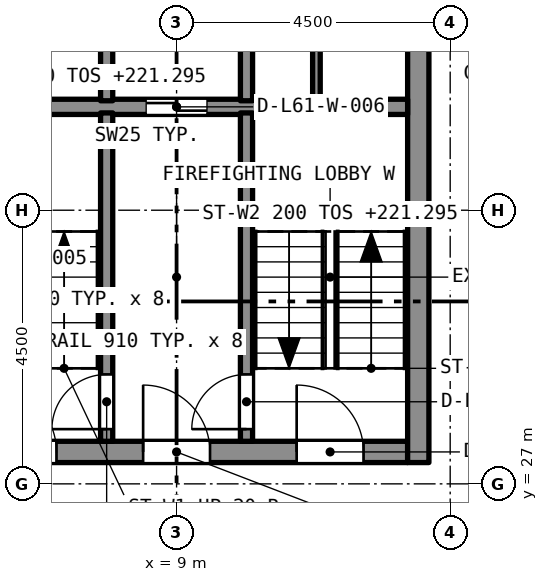
"""IFC4 building model, lengths in metres.
Left out: names, types, materials, properties, quantities, classifications, styles, units other than length and angle.
Written with IfcOpenShell. Run it as: python <this file> out.ifc"""

import sys

from ifc_helpers import new_model, si_unit, direction, frame, frame_2d, origin, place, context, subcontext, project, spatial, rectangle, extrude, element, fill, save


model = new_model("IFC4")
c1 = context("Model", 3, precision=1e-05, world=origin(), true_north=direction((0.0, 1.0)))
c2 = subcontext(c1, "Body", "Model", "MODEL_VIEW")
j1 = project(units=[si_unit("LENGTHUNIT", "METRE"), si_unit("PLANEANGLEUNIT", "RADIAN")], contexts=[c1])
p1 = place(None, origin())
s1 = spatial("IfcSite", under=j1, at=p1, CompositionType="ELEMENT")
p2 = place(p1, origin())
s2 = spatial("IfcBuilding", under=s1, at=p2, CompositionType="ELEMENT")
p3 = place(p2, frame((0.0, 0.0, 219.695)))
s3 = spatial("IfcBuildingStorey", under=s2, at=p3, CompositionType="ELEMENT", Elevation=219.695)
p4 = place(p3, frame((5.2, 27.525, 0.0), z_axis=(0.0, 0.0, 1.0), x_axis=(1.0, 0.0, 0.0)))
e1 = element("IfcWall", 1, at=p4, inside=s3, PredefinedType="SOLIDWALL", context=c2, shape_type="SweptSolid", body=[
    extrude(rectangle(XDim=7.6, YDim=0.35, at=frame_2d((3.8, 0.0))), origin(), (0.0, 0.0, 1.0), 3.2),
])
p5 = place(p4, frame((0.725, 0.0, 0.0)))
e2 = element("IfcOpeningElement", 2, at=p5, cuts=e1, PredefinedType="OPENING", context=c2, shape_type="SweptSolid", body=[
    extrude(rectangle(XDim=1.1, YDim=2.1, at=frame_2d((0.55, 1.05))), frame((0.0, 0.185, 0.0), z_axis=(0.0, -1.0, 0.0), x_axis=(1.0, 0.0, 0.0)), (0.0, 0.0, 1.0), 0.37),
])
p6 = place(p4, frame((3.25, 0.0, 0.0)))
e3 = element("IfcOpeningElement", 3, at=p6, cuts=e1, PredefinedType="OPENING", context=c2, shape_type="SweptSolid", body=[
    extrude(rectangle(XDim=1.1, YDim=2.1, at=frame_2d((0.55, 1.05))), frame((0.0, 0.185, 0.0), z_axis=(0.0, -1.0, 0.0), x_axis=(1.0, 0.0, 0.0)), (0.0, 0.0, 1.0), 0.37),
])
p7 = place(p4, frame((5.775, 0.0, 0.0)))
e4 = element("IfcOpeningElement", 4, at=p7, cuts=e1, PredefinedType="OPENING", context=c2, shape_type="SweptSolid", body=[
    extrude(rectangle(XDim=1.1, YDim=2.1, at=frame_2d((0.55, 1.05))), frame((0.0, 0.185, 0.0), z_axis=(0.0, -1.0, 0.0), x_axis=(1.0, 0.0, 0.0)), (0.0, 0.0, 1.0), 0.37),
])
p8 = place(p3, frame((12.975, 27.35, 0.0), z_axis=(0.0, 0.0, 1.0), x_axis=(0.0, 1.0, 0.0)))
e5 = element("IfcWall", 5, at=p8, inside=s3, PredefinedType="SOLIDWALL", context=c2, shape_type="SweptSolid", body=[
    extrude(rectangle(XDim=12.8, YDim=0.35, at=frame_2d((6.4, 0.0))), origin(), (0.0, 0.0, 1.0), 3.2),
])
p9 = place(p8, frame((10.75, 0.0, 0.0)))
e6 = element("IfcOpeningElement", 6, at=p9, cuts=e5, PredefinedType="OPENING", context=c2, shape_type="SweptSolid", body=[
    extrude(rectangle(XDim=1.1, YDim=2.1, at=frame_2d((0.55, 1.05))), frame((0.0, 0.185, 0.0), z_axis=(0.0, -1.0, 0.0), x_axis=(1.0, 0.0, 0.0)), (0.0, 0.0, 1.0), 0.37),
])
p10 = place(p8, frame((8.6, 0.0, 0.0)))
e7 = element("IfcOpeningElement", 7, at=p10, cuts=e5, PredefinedType="OPENING", context=c2, shape_type="SweptSolid", body=[
    extrude(rectangle(XDim=1.2, YDim=2.1, at=frame_2d((0.6, 1.05))), frame((0.0, 0.185, 0.0), z_axis=(0.0, -1.0, 0.0), x_axis=(1.0, 0.0, 0.0)), (0.0, 0.0, 1.0), 0.37),
])
p11 = place(p3, frame((5.2, 33.2, 0.0), z_axis=(0.0, 0.0, 1.0), x_axis=(1.0, 0.0, 0.0)))
e8 = element("IfcWall", 8, at=p11, inside=s3, PredefinedType="SOLIDWALL", context=c2, shape_type="SweptSolid", body=[
    extrude(rectangle(XDim=7.6, YDim=0.25, at=frame_2d((3.8, 0.0))), origin(), (0.0, 0.0, 1.0), 2.9),
])
p12 = place(p11, frame((3.3, 0.0, 0.0)))
e9 = element("IfcOpeningElement", 9, at=p12, cuts=e8, PredefinedType="OPENING", context=c2, shape_type="SweptSolid", body=[
    extrude(rectangle(XDim=1.0, YDim=2.1, at=frame_2d((0.5, 1.05))), frame((0.0, 0.135, 0.0), z_axis=(0.0, -1.0, 0.0), x_axis=(1.0, 0.0, 0.0)), (0.0, 0.0, 1.0), 0.27),
])
p13 = place(p3, frame((7.85, 27.7, 0.0), z_axis=(0.0, 0.0, 1.0), x_axis=(0.0, 1.0, 0.0)))
e10 = element("IfcWall", 10, at=p13, inside=s3, PredefinedType="SOLIDWALL", context=c2, shape_type="SweptSolid", body=[
    extrude(rectangle(XDim=5.4, YDim=0.2, at=frame_2d((2.7, 0.0))), origin(), (0.0, 0.0, 1.0), 2.9),
])
p14 = place(p13, frame((0.2, 0.0, 0.0)))
e11 = element("IfcOpeningElement", 11, at=p14, cuts=e10, PredefinedType="OPENING", context=c2, shape_type="SweptSolid", body=[
    extrude(rectangle(XDim=0.9, YDim=2.1, at=frame_2d((0.45, 1.05))), frame((0.0, 0.11, 0.0), z_axis=(0.0, -1.0, 0.0), x_axis=(1.0, 0.0, 0.0)), (0.0, 0.0, 1.0), 0.22),
])
p15 = place(p3, frame((10.15, 27.7, 0.0), z_axis=(0.0, 0.0, 1.0), x_axis=(0.0, 1.0, 0.0)))
e12 = element("IfcWall", 12, at=p15, inside=s3, PredefinedType="SOLIDWALL", context=c2, shape_type="SweptSolid", body=[
    extrude(rectangle(XDim=5.4, YDim=0.2, at=frame_2d((2.7, 0.0))), origin(), (0.0, 0.0, 1.0), 2.9),
])
p16 = place(p15, frame((0.2, 0.0, 0.0)))
e13 = element("IfcOpeningElement", 13, at=p16, cuts=e12, PredefinedType="OPENING", context=c2, shape_type="SweptSolid", body=[
    extrude(rectangle(XDim=0.9, YDim=2.1, at=frame_2d((0.45, 1.05))), frame((0.0, 0.11, 0.0), z_axis=(0.0, -1.0, 0.0), x_axis=(1.0, 0.0, 0.0)), (0.0, 0.0, 1.0), 0.22),
])
for number, where, z_axis, x_axis in (
    (14, (7.85, 33.3, 0.0), (0.0, 0.0, 1.0), (0.0, 1.0, 0.0)),
    (15, (10.15, 33.3, 0.0), (0.0, 0.0, 1.0), (0.0, 1.0, 0.0)),
):
    element("IfcWall", number, at=place(p3, frame(where, z_axis=z_axis, x_axis=x_axis)), inside=s3, PredefinedType="SOLIDWALL", context=c2, shape_type="SweptSolid", body=[
        extrude(rectangle(XDim=2.3, YDim=0.2, at=frame_2d((1.15, 0.0))), origin(), (0.0, 0.0, 1.0), 2.9),
    ])
p17 = place(p3, frame((11.3, 33.3, 0.0), z_axis=(0.0, 0.0, 1.0), x_axis=(0.0, 1.0, 0.0)))
e16 = element("IfcWall", 16, at=p17, inside=s3, PredefinedType="PARTITIONING", context=c2, shape_type="SweptSolid", body=[
    extrude(rectangle(XDim=2.3, YDim=0.125, at=frame_2d((1.15, 0.0))), origin(), (0.0, 0.0, 1.0), 2.9),
])
p18 = place(p14, origin())
e17 = element("IfcDoor", 17, at=p18, inside=s3, OperationType="SINGLE_SWING_LEFT", PredefinedType="DOOR", context=c2, shape_type="SweptSolid", body=[
    extrude(rectangle(XDim=0.9, YDim=2.1, at=frame_2d((0.45, 1.05))), frame((0.0, 0.025, 0.0), z_axis=(0.0, -1.0, 0.0), x_axis=(1.0, 0.0, 0.0)), (0.0, 0.0, 1.0), 0.05),
])
fill(e11, e17)
p19 = place(p16, origin())
e18 = element("IfcDoor", 18, at=p19, inside=s3, OperationType="SINGLE_SWING_LEFT", PredefinedType="DOOR", context=c2, shape_type="SweptSolid", body=[
    extrude(rectangle(XDim=0.9, YDim=2.1, at=frame_2d((0.45, 1.05))), frame((0.0, 0.025, 0.0), z_axis=(0.0, -1.0, 0.0), x_axis=(1.0, 0.0, 0.0)), (0.0, 0.0, 1.0), 0.05),
])
fill(e13, e18)
p20 = place(p12, origin())
e19 = element("IfcDoor", 19, at=p20, inside=s3, OperationType="SLIDING_TO_LEFT", PredefinedType="DOOR", context=c2, shape_type="SweptSolid", body=[
    extrude(rectangle(XDim=1.0, YDim=2.1, at=frame_2d((0.5, 1.05))), frame((0.0, 0.025, 0.0), z_axis=(0.0, -1.0, 0.0), x_axis=(1.0, 0.0, 0.0)), (0.0, 0.0, 1.0), 0.05),
])
fill(e9, e19)
p21 = place(p5, origin())
e20 = element("IfcDoor", 20, at=p21, inside=s3, OperationType="SINGLE_SWING_LEFT", PredefinedType="DOOR", context=c2, shape_type="SweptSolid", body=[
    extrude(rectangle(XDim=1.1, YDim=2.1, at=frame_2d((0.55, 1.05))), frame((0.0, 0.025, 0.0), z_axis=(0.0, -1.0, 0.0), x_axis=(1.0, 0.0, 0.0)), (0.0, 0.0, 1.0), 0.05),
])
fill(e2, e20)
p22 = place(p6, origin())
e21 = element("IfcDoor", 21, at=p22, inside=s3, OperationType="SINGLE_SWING_LEFT", PredefinedType="DOOR", context=c2, shape_type="SweptSolid", body=[
    extrude(rectangle(XDim=1.1, YDim=2.1, at=frame_2d((0.55, 1.05))), frame((0.0, 0.025, 0.0), z_axis=(0.0, -1.0, 0.0), x_axis=(1.0, 0.0, 0.0)), (0.0, 0.0, 1.0), 0.05),
])
fill(e3, e21)
p23 = place(p7, origin())
e22 = element("IfcDoor", 22, at=p23, inside=s3, OperationType="SINGLE_SWING_LEFT", PredefinedType="DOOR", context=c2, shape_type="SweptSolid", body=[
    extrude(rectangle(XDim=1.1, YDim=2.1, at=frame_2d((0.55, 1.05))), frame((0.0, 0.025, 0.0), z_axis=(0.0, -1.0, 0.0), x_axis=(1.0, 0.0, 0.0)), (0.0, 0.0, 1.0), 0.05),
])
fill(e4, e22)
save(model, sys.argv[1])
